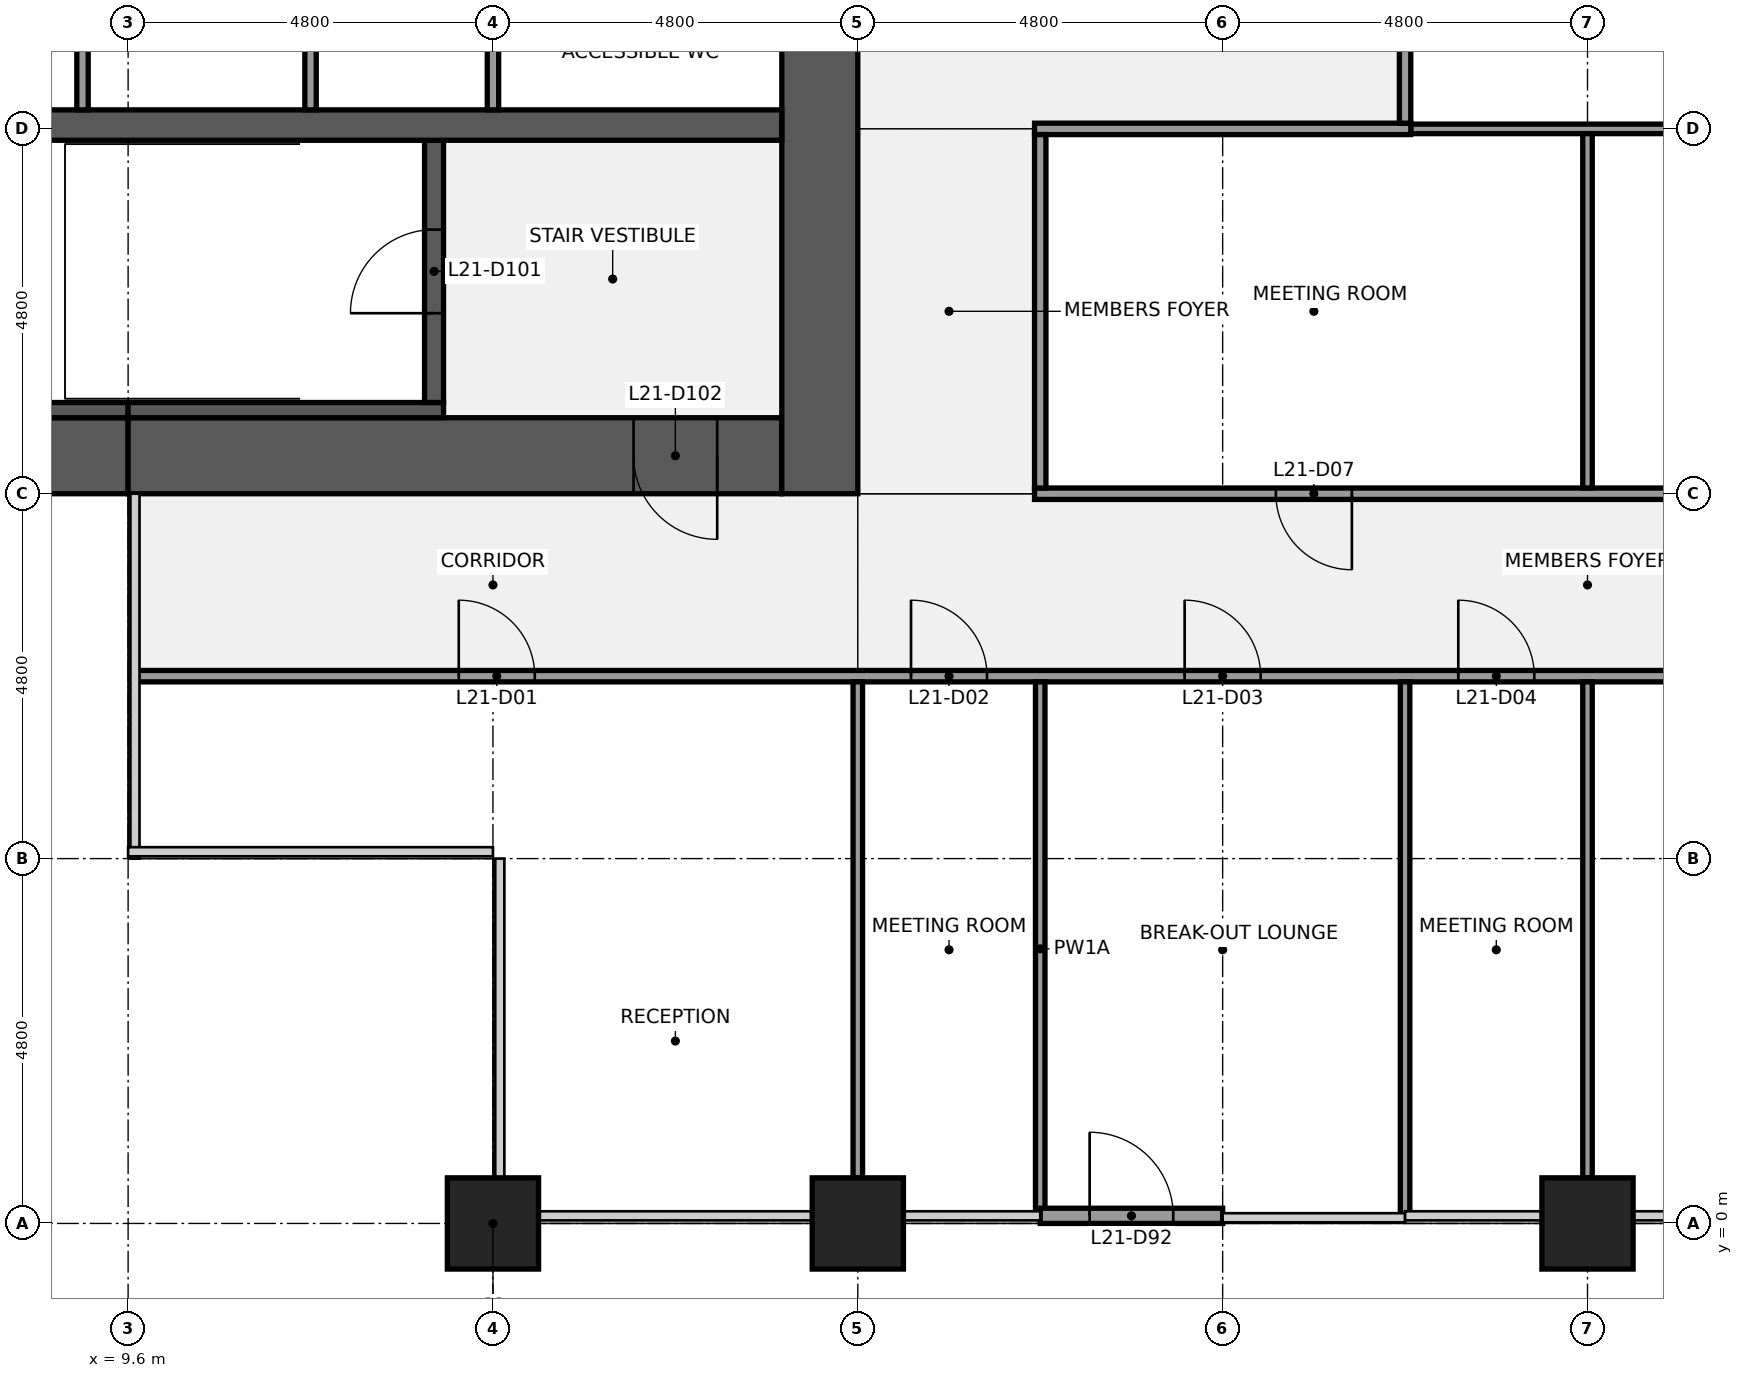
"""IFC4 building model, lengths in metres.
Left out: names, types, materials, properties, quantities, classifications, styles, units other than length and angle.
Written with IfcOpenShell. Run it as: python <this file> out.ifc"""

import sys

from ifc_helpers import new_model, si_unit, direction, frame, frame_2d, origin, origin_2d, place, context, subcontext, project, spatial, rectangle, extrude, element, fill, save


model = new_model("IFC4")
c1 = context("Model", 3, precision=1e-05, world=origin(), true_north=direction((0.0, 1.0)))
c2 = subcontext(c1, "Body", "Model", "MODEL_VIEW")
j1 = project(units=[si_unit("LENGTHUNIT", "METRE"), si_unit("PLANEANGLEUNIT", "RADIAN")], contexts=[c1])
p1 = place(None, origin())
s1 = spatial("IfcSite", under=j1, at=p1, CompositionType="ELEMENT")
p2 = place(p1, origin())
s2 = spatial("IfcBuilding", under=s1, at=p2, CompositionType="ELEMENT")
p3 = place(p2, frame((0.0, 0.0, 104.1)))
s3 = spatial("IfcBuildingStorey", under=s2, at=p3, CompositionType="ELEMENT", Elevation=104.1)
for number, where, z_axis, x_axis in (
    (1, (14.4, 0.0, 0.0), (0.0, 0.0, 1.0), (1.0, 0.0, 0.0)),
    (2, (19.2, 0.0, 0.0), (0.0, 0.0, 1.0), (1.0, 0.0, 0.0)),
    (3, (28.8, 0.0, 0.0), (0.0, 0.0, 1.0), (1.0, 0.0, 0.0)),
):
    element("IfcColumn", number, at=place(p3, frame(where, z_axis=z_axis, x_axis=x_axis)), inside=s3, PredefinedType="COLUMN", context=c2, shape_type="SweptSolid", body=[
        extrude(rectangle(XDim=1.2, YDim=1.2, at=origin_2d()), origin(), (0.0, 0.0, 1.0), 4.0),
    ])
p4 = place(p3, frame((9.6, 10.1, 0.0), z_axis=(0.0, 0.0, 1.0), x_axis=(-1.0, 0.0, 0.0)))
e4 = element("IfcWall", 4, at=p4, inside=s3, PredefinedType="SHEAR", context=c2, shape_type="SweptSolid", body=[
    extrude(rectangle(XDim=8.6, YDim=1.0, at=frame_2d((4.3, 0.0))), origin(), (0.0, 0.0, 1.0), 3.84),
])
p5 = place(p4, frame((1.5, 0.0, 0.9)))
e5 = element("IfcOpeningElement", 5, at=p5, cuts=e4, PredefinedType="OPENING", context=c2, shape_type="SweptSolid", body=[
    extrude(rectangle(XDim=1.8, YDim=1.5, at=frame_2d((0.9, 0.75))), frame((0.0, 0.51, 0.0), z_axis=(0.0, -1.0, 0.0), x_axis=(1.0, 0.0, 0.0)), (0.0, 0.0, 1.0), 1.02),
])
p6 = place(p3, frame((18.2, 10.1, 0.0), z_axis=(0.0, 0.0, 1.0), x_axis=(-1.0, 0.0, 0.0)))
e6 = element("IfcWall", 6, at=p6, inside=s3, PredefinedType="SHEAR", context=c2, shape_type="SweptSolid", body=[
    extrude(rectangle(XDim=8.6, YDim=1.0, at=frame_2d((4.3, 0.0))), origin(), (0.0, 0.0, 1.0), 3.84),
])
p7 = place(p6, frame((0.85, 0.0, 0.0)))
e7 = element("IfcOpeningElement", 7, at=p7, cuts=e6, PredefinedType="OPENING", context=c2, shape_type="SweptSolid", body=[
    extrude(rectangle(XDim=1.1, YDim=2.1, at=frame_2d((0.55, 1.05))), frame((0.0, 0.51, 0.0), z_axis=(0.0, -1.0, 0.0), x_axis=(1.0, 0.0, 0.0)), (0.0, 0.0, 1.0), 1.02),
])
p8 = place(p3, frame((18.7, 38.4, 0.0), z_axis=(0.0, 0.0, 1.0), x_axis=(0.0, -1.0, 0.0)))
e8 = element("IfcWall", 8, at=p8, inside=s3, PredefinedType="SHEAR", context=c2, shape_type="SweptSolid", body=[
    extrude(rectangle(XDim=28.8, YDim=1.0, at=frame_2d((14.4, 0.0))), origin(), (0.0, 0.0, 1.0), 3.84),
])
p9 = place(p8, frame((18.3, 0.0, 0.0)))
e9 = element("IfcOpeningElement", 9, at=p9, cuts=e8, PredefinedType="OPENING", context=c2, shape_type="SweptSolid", body=[
    extrude(rectangle(XDim=1.8, YDim=2.1, at=frame_2d((0.9, 1.05))), frame((0.0, 0.51, 0.0), z_axis=(0.0, -1.0, 0.0), x_axis=(1.0, 0.0, 0.0)), (0.0, 0.0, 1.0), 1.02),
])
p10 = place(p8, frame((8.7, 0.0, 0.0)))
e10 = element("IfcOpeningElement", 10, at=p10, cuts=e8, PredefinedType="OPENING", context=c2, shape_type="SweptSolid", body=[
    extrude(rectangle(XDim=1.8, YDim=2.1, at=frame_2d((0.9, 1.05))), frame((0.0, 0.51, 0.0), z_axis=(0.0, -1.0, 0.0), x_axis=(1.0, 0.0, 0.0)), (0.0, 0.0, 1.0), 1.02),
])
p11 = place(p3, frame((6.25, 10.7, 0.0), z_axis=(0.0, 0.0, 1.0), x_axis=(1.0, 0.0, 0.0)))
e11 = element("IfcWall", 11, at=p11, inside=s3, PredefinedType="SHEAR", context=c2, shape_type="SweptSolid", body=[
    extrude(rectangle(XDim=3.35, YDim=0.2, at=frame_2d((1.675, 0.0))), origin(), (0.0, 0.0, 1.0), 3.84),
])
p12 = place(p3, frame((9.6, 10.7, 0.0), z_axis=(0.0, 0.0, 1.0), x_axis=(1.0, 0.0, 0.0)))
e12 = element("IfcWall", 12, at=p12, inside=s3, PredefinedType="SHEAR", context=c2, shape_type="SweptSolid", body=[
    extrude(rectangle(XDim=4.15, YDim=0.2, at=frame_2d((2.075, 0.0))), origin(), (0.0, 0.0, 1.0), 3.84),
])
p13 = place(p3, frame((13.625, 10.8, 0.0), z_axis=(0.0, 0.0, 1.0), x_axis=(0.0, 1.0, 0.0)))
e13 = element("IfcWall", 13, at=p13, inside=s3, PredefinedType="SHEAR", context=c2, shape_type="SweptSolid", body=[
    extrude(rectangle(XDim=3.45, YDim=0.25, at=frame_2d((1.725, 0.0))), origin(), (0.0, 0.0, 1.0), 3.84),
])
p14 = place(p13, frame((1.175, 0.0, 0.0)))
e14 = element("IfcOpeningElement", 14, at=p14, cuts=e13, PredefinedType="OPENING", context=c2, shape_type="SweptSolid", body=[
    extrude(rectangle(XDim=1.1, YDim=2.1, at=frame_2d((0.55, 1.05))), frame((0.0, 0.135, 0.0), z_axis=(0.0, -1.0, 0.0), x_axis=(1.0, 0.0, 0.0)), (0.0, 0.0, 1.0), 0.27),
])
p15 = place(p3, frame((1.0, 14.45, 0.0), z_axis=(0.0, 0.0, 1.0), x_axis=(1.0, 0.0, 0.0)))
e15 = element("IfcWall", 15, at=p15, inside=s3, PredefinedType="SHEAR", context=c2, shape_type="SweptSolid", body=[
    extrude(rectangle(XDim=17.2, YDim=0.4, at=frame_2d((8.6, 0.0))), origin(), (0.0, 0.0, 1.0), 3.84),
])
for number, where, z_axis, x_axis in (
    (16, (9.0, 14.65, 0.0), (0.0, 0.0, 1.0), (0.0, 1.0, 0.0)),
    (17, (12.0, 14.65, 0.0), (0.0, 0.0, 1.0), (0.0, 1.0, 0.0)),
    (18, (14.4, 14.65, 0.0), (0.0, 0.0, 1.0), (0.0, 1.0, 0.0)),
):
    element("IfcWall", number, at=place(p3, frame(where, z_axis=z_axis, x_axis=x_axis)), inside=s3, PredefinedType="PARTITIONING", context=c2, shape_type="SweptSolid", body=[
        extrude(rectangle(XDim=2.6, YDim=0.15, at=frame_2d((1.3, 0.0))), origin(), (0.0, 0.0, 1.0), 3.84),
    ])
p16 = place(p3, frame((9.7, 7.2, 0.0), z_axis=(0.0, 0.0, 1.0), x_axis=(1.0, 0.0, 0.0)))
e19 = element("IfcWall", 19, at=p16, inside=s3, PredefinedType="PARTITIONING", context=c2, shape_type="SweptSolid", body=[
    extrude(rectangle(XDim=38.375, YDim=0.15, at=frame_2d((19.188, 0.0))), origin(), (0.0, 0.0, 1.0), 2.936),
])
p17 = place(p16, frame((4.25, 0.0, 0.0)))
e20 = element("IfcOpeningElement", 20, at=p17, cuts=e19, PredefinedType="OPENING", context=c2, shape_type="SweptSolid", body=[
    extrude(rectangle(XDim=1.0, YDim=2.1, at=frame_2d((0.5, 1.05))), frame((0.0, 0.085, 0.0), z_axis=(0.0, -1.0, 0.0), x_axis=(1.0, 0.0, 0.0)), (0.0, 0.0, 1.0), 0.17),
])
p18 = place(p16, frame((10.2, 0.0, 0.0)))
e21 = element("IfcOpeningElement", 21, at=p18, cuts=e19, PredefinedType="OPENING", context=c2, shape_type="SweptSolid", body=[
    extrude(rectangle(XDim=1.0, YDim=2.1, at=frame_2d((0.5, 1.05))), frame((0.0, 0.085, 0.0), z_axis=(0.0, -1.0, 0.0), x_axis=(1.0, 0.0, 0.0)), (0.0, 0.0, 1.0), 0.17),
])
p19 = place(p16, frame((13.8, 0.0, 0.0)))
e22 = element("IfcOpeningElement", 22, at=p19, cuts=e19, PredefinedType="OPENING", context=c2, shape_type="SweptSolid", body=[
    extrude(rectangle(XDim=1.0, YDim=2.1, at=frame_2d((0.5, 1.05))), frame((0.0, 0.085, 0.0), z_axis=(0.0, -1.0, 0.0), x_axis=(1.0, 0.0, 0.0)), (0.0, 0.0, 1.0), 0.17),
])
p20 = place(p16, frame((17.4, 0.0, 0.0)))
e23 = element("IfcOpeningElement", 23, at=p20, cuts=e19, PredefinedType="OPENING", context=c2, shape_type="SweptSolid", body=[
    extrude(rectangle(XDim=1.0, YDim=2.1, at=frame_2d((0.5, 1.05))), frame((0.0, 0.085, 0.0), z_axis=(0.0, -1.0, 0.0), x_axis=(1.0, 0.0, 0.0)), (0.0, 0.0, 1.0), 0.17),
])
p21 = place(p16, frame((23.4, 0.0, 0.0)))
e24 = element("IfcOpeningElement", 24, at=p21, cuts=e19, PredefinedType="OPENING", context=c2, shape_type="SweptSolid", body=[
    extrude(rectangle(XDim=1.0, YDim=2.1, at=frame_2d((0.5, 1.05))), frame((0.0, 0.085, 0.0), z_axis=(0.0, -1.0, 0.0), x_axis=(1.0, 0.0, 0.0)), (0.0, 0.0, 1.0), 0.17),
])
p22 = place(p16, frame((33.0, 0.0, 0.0)))
e25 = element("IfcOpeningElement", 25, at=p22, cuts=e19, PredefinedType="OPENING", context=c2, shape_type="SweptSolid", body=[
    extrude(rectangle(XDim=1.0, YDim=2.1, at=frame_2d((0.5, 1.05))), frame((0.0, 0.085, 0.0), z_axis=(0.0, -1.0, 0.0), x_axis=(1.0, 0.0, 0.0)), (0.0, 0.0, 1.0), 0.17),
])
p23 = place(p3, frame((21.525, 9.6, 0.0), z_axis=(0.0, 0.0, 1.0), x_axis=(1.0, 0.0, 0.0)))
e26 = element("IfcWall", 26, at=p23, inside=s3, PredefinedType="PARTITIONING", context=c2, shape_type="SweptSolid", body=[
    extrude(rectangle(XDim=14.55, YDim=0.15, at=frame_2d((7.275, 0.0))), origin(), (0.0, 0.0, 1.0), 2.936),
])
p24 = place(p23, frame((3.175, 0.0, 0.0)))
e27 = element("IfcOpeningElement", 27, at=p24, cuts=e26, PredefinedType="OPENING", context=c2, shape_type="SweptSolid", body=[
    extrude(rectangle(XDim=1.0, YDim=2.1, at=frame_2d((0.5, 1.05))), frame((0.0, 0.085, 0.0), z_axis=(0.0, -1.0, 0.0), x_axis=(1.0, 0.0, 0.0)), (0.0, 0.0, 1.0), 0.17),
])
p25 = place(p23, frame((10.375, 0.0, 0.0)))
e28 = element("IfcOpeningElement", 28, at=p25, cuts=e26, PredefinedType="OPENING", context=c2, shape_type="SweptSolid", body=[
    extrude(rectangle(XDim=1.0, YDim=2.1, at=frame_2d((0.5, 1.05))), frame((0.0, 0.085, 0.0), z_axis=(0.0, -1.0, 0.0), x_axis=(1.0, 0.0, 0.0)), (0.0, 0.0, 1.0), 0.17),
])
p26 = place(p3, frame((26.475, 14.4, 0.0), z_axis=(0.0, 0.0, 1.0), x_axis=(1.0, 0.0, 0.0)))
e29 = element("IfcWall", 29, at=p26, inside=s3, PredefinedType="PARTITIONING", context=c2, shape_type="SweptSolid", body=[
    extrude(rectangle(XDim=4.8, YDim=0.125, at=frame_2d((2.4, 0.0))), origin(), (0.0, 0.0, 1.0), 2.936),
])
p27 = place(p3, frame((21.525, 14.4, 0.0), z_axis=(0.0, 0.0, 1.0), x_axis=(1.0, 0.0, 0.0)))
e30 = element("IfcWall", 30, at=p27, inside=s3, PredefinedType="PARTITIONING", context=c2, shape_type="SweptSolid", body=[
    extrude(rectangle(XDim=4.95, YDim=0.15, at=frame_2d((2.475, 0.0))), origin(), (0.0, 0.0, 1.0), 2.936),
])
p28 = place(p3, frame((19.2, 0.6, 0.0), z_axis=(0.0, 0.0, 1.0), x_axis=(0.0, 1.0, 0.0)))
e31 = element("IfcWall", 31, at=p28, inside=s3, PredefinedType="PARTITIONING", context=c2, shape_type="SweptSolid", body=[
    extrude(rectangle(XDim=6.525, YDim=0.125, at=frame_2d((3.262, 0.0))), origin(), (0.0, 0.0, 1.0), 2.936),
])
p29 = place(p3, frame((21.6, 0.1, 0.0), z_axis=(0.0, 0.0, 1.0), x_axis=(0.0, 1.0, 0.0)))
e32 = element("IfcWall", 32, at=p29, inside=s3, PredefinedType="PARTITIONING", context=c2, shape_type="SweptSolid", body=[
    extrude(rectangle(XDim=7.025, YDim=0.125, at=frame_2d((3.512, 0.0))), origin(), (0.0, 0.0, 1.0), 2.936),
])
p30 = place(p3, frame((21.6, 9.675, 0.0), z_axis=(0.0, 0.0, 1.0), x_axis=(0.0, 1.0, 0.0)))
e33 = element("IfcWall", 33, at=p30, inside=s3, PredefinedType="PARTITIONING", context=c2, shape_type="SweptSolid", body=[
    extrude(rectangle(XDim=4.65, YDim=0.15, at=frame_2d((2.325, 0.0))), origin(), (0.0, 0.0, 1.0), 2.936),
])
p31 = place(p3, frame((26.4, 0.1, 0.0), z_axis=(0.0, 0.0, 1.0), x_axis=(0.0, 1.0, 0.0)))
e34 = element("IfcWall", 34, at=p31, inside=s3, PredefinedType="PARTITIONING", context=c2, shape_type="SweptSolid", body=[
    extrude(rectangle(XDim=7.025, YDim=0.125, at=frame_2d((3.512, 0.0))), origin(), (0.0, 0.0, 1.0), 2.936),
])
p32 = place(p3, frame((26.4, 14.475, 0.0), z_axis=(0.0, 0.0, 1.0), x_axis=(0.0, 1.0, 0.0)))
e35 = element("IfcWall", 35, at=p32, inside=s3, PredefinedType="PARTITIONING", context=c2, shape_type="SweptSolid", body=[
    extrude(rectangle(XDim=3.45, YDim=0.15, at=frame_2d((1.725, 0.0))), origin(), (0.0, 0.0, 1.0), 2.936),
])
p33 = place(p3, frame((28.8, 0.6, 0.0), z_axis=(0.0, 0.0, 1.0), x_axis=(0.0, 1.0, 0.0)))
e36 = element("IfcWall", 36, at=p33, inside=s3, PredefinedType="PARTITIONING", context=c2, shape_type="SweptSolid", body=[
    extrude(rectangle(XDim=6.525, YDim=0.125, at=frame_2d((3.262, 0.0))), origin(), (0.0, 0.0, 1.0), 2.936),
])
p34 = place(p3, frame((28.8, 9.675, 0.0), z_axis=(0.0, 0.0, 1.0), x_axis=(0.0, 1.0, 0.0)))
e37 = element("IfcWall", 37, at=p34, inside=s3, PredefinedType="PARTITIONING", context=c2, shape_type="SweptSolid", body=[
    extrude(rectangle(XDim=4.662, YDim=0.125, at=frame_2d((2.331, 0.0))), origin(), (0.0, 0.0, 1.0), 2.936),
])
p35 = place(p3, frame((21.6, 0.1, 0.0), z_axis=(0.0, 0.0, 1.0), x_axis=(1.0, 0.0, 0.0)))
e38 = element("IfcWall", 38, at=p35, inside=s3, PredefinedType="SOLIDWALL", context=c2, shape_type="SweptSolid", body=[
    extrude(rectangle(XDim=2.4, YDim=0.2, at=frame_2d((1.2, 0.0))), origin(), (0.0, 0.0, 1.0), 3.314),
])
p36 = place(p35, frame((0.65, 0.0, 0.0)))
e39 = element("IfcOpeningElement", 39, at=p36, cuts=e38, PredefinedType="OPENING", context=c2, shape_type="SweptSolid", body=[
    extrude(rectangle(XDim=1.1, YDim=2.1, at=frame_2d((0.55, 1.05))), frame((0.0, 0.11, 0.0), z_axis=(0.0, -1.0, 0.0), x_axis=(1.0, 0.0, 0.0)), (0.0, 0.0, 1.0), 0.22),
])
for number, where, z_axis, x_axis in (
    (40, (14.4, -1.05, 0.0), (0.0, 0.0, 1.0), (1.0, 0.0, 0.0)),
    (41, (19.2, -1.05, 0.0), (0.0, 0.0, 1.0), (1.0, 0.0, 0.0)),
):
    element("IfcColumn", number, at=place(p3, frame(where, z_axis=z_axis, x_axis=x_axis)), inside=s3, PredefinedType="PILASTER", context=c2, shape_type="SweptSolid", body=[
        extrude(rectangle(XDim=3.6, YDim=0.9, at=origin_2d()), origin(), (0.0, 0.0, 1.0), 4.0),
    ])
p37 = place(p14, origin())
e42 = element("IfcDoor", 42, at=p37, inside=s3, OperationType="SINGLE_SWING_LEFT", PredefinedType="DOOR", context=c2, shape_type="SweptSolid", body=[
    extrude(rectangle(XDim=1.1, YDim=2.1, at=frame_2d((0.55, 1.05))), frame((0.0, 0.025, 0.0), z_axis=(0.0, -1.0, 0.0), x_axis=(1.0, 0.0, 0.0)), (0.0, 0.0, 1.0), 0.05),
])
fill(e14, e42)
p38 = place(p7, origin())
e43 = element("IfcDoor", 43, at=p38, inside=s3, OperationType="SINGLE_SWING_LEFT", PredefinedType="DOOR", context=c2, shape_type="SweptSolid", body=[
    extrude(rectangle(XDim=1.1, YDim=2.1, at=frame_2d((0.55, 1.05))), frame((0.0, 0.025, 0.0), z_axis=(0.0, -1.0, 0.0), x_axis=(1.0, 0.0, 0.0)), (0.0, 0.0, 1.0), 0.05),
])
fill(e7, e43)
p39 = place(p17, origin())
e44 = element("IfcDoor", 44, at=p39, inside=s3, OperationType="SINGLE_SWING_LEFT", PredefinedType="DOOR", context=c2, shape_type="SweptSolid", body=[
    extrude(rectangle(XDim=1.0, YDim=2.1, at=frame_2d((0.5, 1.05))), frame((0.0, 0.025, 0.0), z_axis=(0.0, -1.0, 0.0), x_axis=(1.0, 0.0, 0.0)), (0.0, 0.0, 1.0), 0.05),
])
fill(e20, e44)
p40 = place(p18, origin())
e45 = element("IfcDoor", 45, at=p40, inside=s3, OperationType="SINGLE_SWING_LEFT", PredefinedType="DOOR", context=c2, shape_type="SweptSolid", body=[
    extrude(rectangle(XDim=1.0, YDim=2.1, at=frame_2d((0.5, 1.05))), frame((0.0, 0.025, 0.0), z_axis=(0.0, -1.0, 0.0), x_axis=(1.0, 0.0, 0.0)), (0.0, 0.0, 1.0), 0.05),
])
fill(e21, e45)
p41 = place(p19, origin())
e46 = element("IfcDoor", 46, at=p41, inside=s3, OperationType="SINGLE_SWING_LEFT", PredefinedType="DOOR", context=c2, shape_type="SweptSolid", body=[
    extrude(rectangle(XDim=1.0, YDim=2.1, at=frame_2d((0.5, 1.05))), frame((0.0, 0.025, 0.0), z_axis=(0.0, -1.0, 0.0), x_axis=(1.0, 0.0, 0.0)), (0.0, 0.0, 1.0), 0.05),
])
fill(e22, e46)
p42 = place(p20, origin())
e47 = element("IfcDoor", 47, at=p42, inside=s3, OperationType="SINGLE_SWING_LEFT", PredefinedType="DOOR", context=c2, shape_type="SweptSolid", body=[
    extrude(rectangle(XDim=1.0, YDim=2.1, at=frame_2d((0.5, 1.05))), frame((0.0, 0.025, 0.0), z_axis=(0.0, -1.0, 0.0), x_axis=(1.0, 0.0, 0.0)), (0.0, 0.0, 1.0), 0.05),
])
fill(e23, e47)
p43 = place(p24, origin())
e48 = element("IfcDoor", 48, at=p43, inside=s3, OperationType="SINGLE_SWING_RIGHT", PredefinedType="DOOR", context=c2, shape_type="SweptSolid", body=[
    extrude(rectangle(XDim=1.0, YDim=2.1, at=frame_2d((0.5, 1.05))), frame((0.0, 0.025, 0.0), z_axis=(0.0, -1.0, 0.0), x_axis=(1.0, 0.0, 0.0)), (0.0, 0.0, 1.0), 0.05),
])
fill(e27, e48)
p44 = place(p36, origin())
e49 = element("IfcDoor", 49, at=p44, inside=s3, OperationType="SINGLE_SWING_LEFT", PredefinedType="DOOR", context=c2, shape_type="SweptSolid", body=[
    extrude(rectangle(XDim=1.1, YDim=2.1, at=frame_2d((0.55, 1.05))), frame((0.0, 0.025, 0.0), z_axis=(0.0, -1.0, 0.0), x_axis=(1.0, 0.0, 0.0)), (0.0, 0.0, 1.0), 0.05),
])
fill(e39, e49)
save(model, sys.argv[1])
